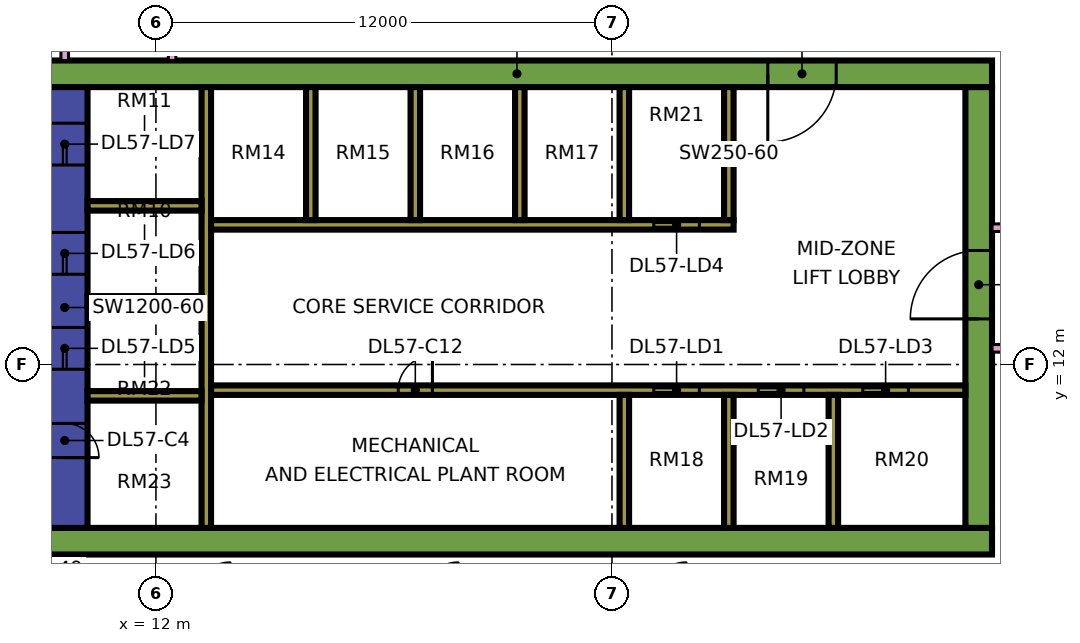
"""IFC4 building model, lengths in metres.
Left out: names, types, materials, properties, quantities, classifications, styles, units other than length and angle.
Written with IfcOpenShell. Run it as: python <this file> out.ifc"""

import sys

from ifc_helpers import new_model, si_unit, direction, frame, frame_2d, origin, place, context, subcontext, project, spatial, rectangle, extrude, element, fill, save


model = new_model("IFC4")
c1 = context("Model", 3, precision=1e-05, world=origin(), true_north=direction((0.0, 1.0)))
c2 = subcontext(c1, "Body", "Model", "MODEL_VIEW")
j1 = project(units=[si_unit("LENGTHUNIT", "METRE"), si_unit("PLANEANGLEUNIT", "RADIAN")], contexts=[c1])
p1 = place(None, origin())
s1 = spatial("IfcSite", under=j1, at=p1, CompositionType="ELEMENT")
p2 = place(p1, origin())
s2 = spatial("IfcBuilding", under=s1, at=p2, CompositionType="ELEMENT")
p3 = place(p2, frame((0.0, 0.0, 241.65)))
s3 = spatial("IfcBuildingStorey", under=s2, at=p3, CompositionType="ELEMENT", Elevation=241.65)
p4 = place(p3, frame((9.0, 7.35, 0.0), z_axis=(0.0, 0.0, 1.0), x_axis=(1.0, 0.0, 0.0)))
e1 = element("IfcWall", 1, at=p4, inside=s3, PredefinedType="SHEAR", context=c2, shape_type="SweptSolid", body=[
    extrude(rectangle(XDim=25.0, YDim=0.7, at=frame_2d((12.5, 0.0))), origin(), (0.0, 0.0, 1.0), 3.75),
])
p5 = place(p3, frame((9.0, 19.65, 0.0), z_axis=(0.0, 0.0, 1.0), x_axis=(1.0, 0.0, 0.0)))
e2 = element("IfcWall", 2, at=p5, inside=s3, PredefinedType="SHEAR", context=c2, shape_type="SweptSolid", body=[
    extrude(rectangle(XDim=25.0, YDim=0.7, at=frame_2d((12.5, 0.0))), origin(), (0.0, 0.0, 1.0), 3.75),
])
p6 = place(p5, frame((19.1, 0.0, 0.0)))
e3 = element("IfcOpeningElement", 3, at=p6, cuts=e2, PredefinedType="OPENING", context=c2, shape_type="SweptSolid", body=[
    extrude(rectangle(XDim=1.8, YDim=2.4, at=frame_2d((0.9, 1.2))), frame((0.0, 0.36, 0.0), z_axis=(0.0, -1.0, 0.0), x_axis=(1.0, 0.0, 0.0)), (0.0, 0.0, 1.0), 0.72),
])
p7 = place(p3, frame((9.6, 7.7, 0.0), z_axis=(0.0, 0.0, 1.0), x_axis=(0.0, 1.0, 0.0)))
e4 = element("IfcWall", 4, at=p7, inside=s3, PredefinedType="SHEAR", context=c2, shape_type="SweptSolid", body=[
    extrude(rectangle(XDim=11.6, YDim=1.2, at=frame_2d((5.8, 0.0))), origin(), (0.0, 0.0, 1.0), 3.75),
])
p8 = place(p7, frame((4.175, 0.0, 0.0)))
e5 = element("IfcOpeningElement", 5, at=p8, cuts=e4, PredefinedType="OPENING", context=c2, shape_type="SweptSolid", body=[
    extrude(rectangle(XDim=1.1, YDim=2.2, at=frame_2d((0.55, 1.1))), frame((0.0, 0.61, 0.0), z_axis=(0.0, -1.0, 0.0), x_axis=(1.0, 0.0, 0.0)), (0.0, 0.0, 1.0), 1.22),
])
p9 = place(p7, frame((6.675, 0.0, 0.0)))
e6 = element("IfcOpeningElement", 6, at=p9, cuts=e4, PredefinedType="OPENING", context=c2, shape_type="SweptSolid", body=[
    extrude(rectangle(XDim=1.1, YDim=2.2, at=frame_2d((0.55, 1.1))), frame((0.0, 0.61, 0.0), z_axis=(0.0, -1.0, 0.0), x_axis=(1.0, 0.0, 0.0)), (0.0, 0.0, 1.0), 1.22),
])
p10 = place(p7, frame((9.55, 0.0, 0.0)))
e7 = element("IfcOpeningElement", 7, at=p10, cuts=e4, PredefinedType="OPENING", context=c2, shape_type="SweptSolid", body=[
    extrude(rectangle(XDim=1.1, YDim=2.2, at=frame_2d((0.55, 1.1))), frame((0.0, 0.61, 0.0), z_axis=(0.0, -1.0, 0.0), x_axis=(1.0, 0.0, 0.0)), (0.0, 0.0, 1.0), 1.22),
])
p11 = place(p7, frame((1.85, 0.0, 0.0)))
e8 = element("IfcOpeningElement", 8, at=p11, cuts=e4, PredefinedType="OPENING", context=c2, shape_type="SweptSolid", body=[
    extrude(rectangle(XDim=0.9, YDim=2.1, at=frame_2d((0.45, 1.05))), frame((0.0, 0.61, 0.0), z_axis=(0.0, -1.0, 0.0), x_axis=(1.0, 0.0, 0.0)), (0.0, 0.0, 1.0), 1.22),
])
p12 = place(p3, frame((33.65, 7.7, 0.0), z_axis=(0.0, 0.0, 1.0), x_axis=(0.0, 1.0, 0.0)))
e9 = element("IfcWall", 9, at=p12, inside=s3, PredefinedType="SHEAR", context=c2, shape_type="SweptSolid", body=[
    extrude(rectangle(XDim=11.6, YDim=0.7, at=frame_2d((5.8, 0.0))), origin(), (0.0, 0.0, 1.0), 3.75),
])
p13 = place(p12, frame((5.5, 0.0, 0.0)))
e10 = element("IfcOpeningElement", 10, at=p13, cuts=e9, PredefinedType="OPENING", context=c2, shape_type="SweptSolid", body=[
    extrude(rectangle(XDim=1.8, YDim=2.4, at=frame_2d((0.9, 1.2))), frame((0.0, 0.36, 0.0), z_axis=(0.0, -1.0, 0.0), x_axis=(1.0, 0.0, 0.0)), (0.0, 0.0, 1.0), 0.72),
])
p14 = place(p3, frame((13.325, 7.7, 0.0), z_axis=(0.0, 0.0, 1.0), x_axis=(0.0, 1.0, 0.0)))
e11 = element("IfcWall", 11, at=p14, inside=s3, PredefinedType="SHEAR", context=c2, shape_type="SweptSolid", body=[
    extrude(rectangle(XDim=11.6, YDim=0.25, at=frame_2d((5.8, 0.0))), origin(), (0.0, 0.0, 1.0), 3.75),
])
p15 = place(p3, frame((13.45, 11.325, 0.0), z_axis=(0.0, 0.0, 1.0), x_axis=(1.0, 0.0, 0.0)))
e12 = element("IfcWall", 12, at=p15, inside=s3, PredefinedType="SHEAR", context=c2, shape_type="SweptSolid", body=[
    extrude(rectangle(XDim=19.85, YDim=0.25, at=frame_2d((9.925, 0.0))), origin(), (0.0, 0.0, 1.0), 3.75),
])
p16 = place(p15, frame((11.65, 0.0, 0.0)))
e13 = element("IfcOpeningElement", 13, at=p16, cuts=e12, PredefinedType="OPENING", context=c2, shape_type="SweptSolid", body=[
    extrude(rectangle(XDim=1.2, YDim=2.2, at=frame_2d((0.6, 1.1))), frame((0.0, 0.135, 0.0), z_axis=(0.0, -1.0, 0.0), x_axis=(1.0, 0.0, 0.0)), (0.0, 0.0, 1.0), 0.27),
])
p17 = place(p15, frame((14.4, 0.0, 0.0)))
e14 = element("IfcOpeningElement", 14, at=p17, cuts=e12, PredefinedType="OPENING", context=c2, shape_type="SweptSolid", body=[
    extrude(rectangle(XDim=1.2, YDim=2.2, at=frame_2d((0.6, 1.1))), frame((0.0, 0.135, 0.0), z_axis=(0.0, -1.0, 0.0), x_axis=(1.0, 0.0, 0.0)), (0.0, 0.0, 1.0), 0.27),
])
p18 = place(p15, frame((17.15, 0.0, 0.0)))
e15 = element("IfcOpeningElement", 15, at=p18, cuts=e12, PredefinedType="OPENING", context=c2, shape_type="SweptSolid", body=[
    extrude(rectangle(XDim=1.2, YDim=2.2, at=frame_2d((0.6, 1.1))), frame((0.0, 0.135, 0.0), z_axis=(0.0, -1.0, 0.0), x_axis=(1.0, 0.0, 0.0)), (0.0, 0.0, 1.0), 0.27),
])
p19 = place(p15, frame((4.925, 0.0, 0.0)))
e16 = element("IfcOpeningElement", 16, at=p19, cuts=e12, PredefinedType="OPENING", context=c2, shape_type="SweptSolid", body=[
    extrude(rectangle(XDim=0.9, YDim=2.1, at=frame_2d((0.45, 1.05))), frame((0.0, 0.135, 0.0), z_axis=(0.0, -1.0, 0.0), x_axis=(1.0, 0.0, 0.0)), (0.0, 0.0, 1.0), 0.27),
])
p20 = place(p3, frame((13.45, 15.675, 0.0), z_axis=(0.0, 0.0, 1.0), x_axis=(1.0, 0.0, 0.0)))
e17 = element("IfcWall", 17, at=p20, inside=s3, PredefinedType="SHEAR", context=c2, shape_type="SweptSolid", body=[
    extrude(rectangle(XDim=13.75, YDim=0.25, at=frame_2d((6.875, 0.0))), origin(), (0.0, 0.0, 1.0), 3.75),
])
p21 = place(p20, frame((11.65, 0.0, 0.0)))
e18 = element("IfcOpeningElement", 18, at=p21, cuts=e17, PredefinedType="OPENING", context=c2, shape_type="SweptSolid", body=[
    extrude(rectangle(XDim=1.2, YDim=2.2, at=frame_2d((0.6, 1.1))), frame((0.0, 0.135, 0.0), z_axis=(0.0, -1.0, 0.0), x_axis=(1.0, 0.0, 0.0)), (0.0, 0.0, 1.0), 0.27),
])
for number, where, z_axis, x_axis in (
    (19, (10.2, 11.175, 0.0), (0.0, 0.0, 1.0), (1.0, 0.0, 0.0)),
    (20, (10.2, 13.675, 0.0), (0.0, 0.0, 1.0), (1.0, 0.0, 0.0)),
    (21, (10.2, 16.175, 0.0), (0.0, 0.0, 1.0), (1.0, 0.0, 0.0)),
):
    element("IfcWall", number, at=place(p3, frame(where, z_axis=z_axis, x_axis=x_axis)), inside=s3, PredefinedType="SHEAR", context=c2, shape_type="SweptSolid", body=[
        extrude(rectangle(XDim=3.0, YDim=0.25, at=frame_2d((1.5, 0.0))), origin(), (0.0, 0.0, 1.0), 3.75),
    ])
for number, where, z_axis, x_axis in (
    (22, (24.325, 7.7, 0.0), (0.0, 0.0, 1.0), (0.0, 1.0, 0.0)),
    (23, (27.075, 7.7, 0.0), (0.0, 0.0, 1.0), (0.0, 1.0, 0.0)),
    (24, (29.825, 7.7, 0.0), (0.0, 0.0, 1.0), (0.0, 1.0, 0.0)),
    (25, (16.075, 15.8, 0.0), (0.0, 0.0, 1.0), (0.0, 1.0, 0.0)),
    (26, (18.825, 15.8, 0.0), (0.0, 0.0, 1.0), (0.0, 1.0, 0.0)),
    (27, (21.575, 15.8, 0.0), (0.0, 0.0, 1.0), (0.0, 1.0, 0.0)),
    (28, (24.325, 15.8, 0.0), (0.0, 0.0, 1.0), (0.0, 1.0, 0.0)),
    (29, (27.075, 15.8, 0.0), (0.0, 0.0, 1.0), (0.0, 1.0, 0.0)),
):
    element("IfcWall", number, at=place(p3, frame(where, z_axis=z_axis, x_axis=x_axis)), inside=s3, PredefinedType="SHEAR", context=c2, shape_type="SweptSolid", body=[
        extrude(rectangle(XDim=3.5, YDim=0.25, at=frame_2d((1.75, 0.0))), origin(), (0.0, 0.0, 1.0), 3.75),
    ])
p22 = place(p3, frame((-1.447, 12.553, 0.0), z_axis=(0.0, 0.0, 1.0), x_axis=(0.707106781187, -0.707106781187, 0.0)))
e30 = element("IfcWall", 30, at=p22, inside=s3, PredefinedType="SOLIDWALL", context=c2, shape_type="SweptSolid", body=[
    extrude(rectangle(XDim=19.799, YDim=0.15, at=frame_2d((9.899, 0.0))), origin(), (0.0, 0.0, 1.0), 3.35),
])
p23 = place(p22, frame((2.212, 0.0, 0.45)))
e31 = element("IfcOpeningElement", 31, at=p23, cuts=e30, PredefinedType="OPENING", context=c2, shape_type="SweptSolid", body=[
    extrude(rectangle(XDim=3.0, YDim=2.4, at=frame_2d((1.5, 1.2))), frame((0.0, 0.085, 0.0), z_axis=(0.0, -1.0, 0.0), x_axis=(1.0, 0.0, 0.0)), (0.0, 0.0, 1.0), 0.17),
])
p24 = place(p22, frame((10.216, 0.0, 0.45)))
e32 = element("IfcOpeningElement", 32, at=p24, cuts=e30, PredefinedType="OPENING", context=c2, shape_type="SweptSolid", body=[
    extrude(rectangle(XDim=3.0, YDim=2.4, at=frame_2d((1.5, 1.2))), frame((0.0, 0.085, 0.0), z_axis=(0.0, -1.0, 0.0), x_axis=(1.0, 0.0, 0.0)), (0.0, 0.0, 1.0), 0.17),
])
p25 = place(p3, frame((9.6, 20.0, 0.0), z_axis=(0.0, 0.0, 1.0), x_axis=(0.0, 1.0, 0.0)))
e33 = element("IfcWall", 33, at=p25, inside=s3, PredefinedType="PARTITIONING", context=c2, shape_type="SweptSolid", body=[
    extrude(rectangle(XDim=42.926, YDim=0.2, at=frame_2d((21.463, 0.0))), origin(), (0.0, 0.0, 1.0), 3.35),
])
p26 = place(p25, frame((28.95, 0.0, 0.0)))
e34 = element("IfcOpeningElement", 34, at=p26, cuts=e33, PredefinedType="OPENING", context=c2, shape_type="SweptSolid", body=[
    extrude(rectangle(XDim=1.0, YDim=2.1, at=frame_2d((0.5, 1.05))), frame((0.0, 0.11, 0.0), z_axis=(0.0, -1.0, 0.0), x_axis=(1.0, 0.0, 0.0)), (0.0, 0.0, 1.0), 0.22),
])
p27 = place(p25, frame((31.95, 0.0, 0.0)))
e35 = element("IfcOpeningElement", 35, at=p27, cuts=e33, PredefinedType="OPENING", context=c2, shape_type="SweptSolid", body=[
    extrude(rectangle(XDim=1.0, YDim=2.1, at=frame_2d((0.5, 1.05))), frame((0.0, 0.11, 0.0), z_axis=(0.0, -1.0, 0.0), x_axis=(1.0, 0.0, 0.0)), (0.0, 0.0, 1.0), 0.22),
])
p28 = place(p25, frame((0.6, 0.0, 0.0)))
e36 = element("IfcOpeningElement", 36, at=p28, cuts=e33, PredefinedType="OPENING", context=c2, shape_type="SweptSolid", body=[
    extrude(rectangle(XDim=1.2, YDim=2.1, at=frame_2d((0.6, 1.05))), frame((0.0, 0.11, 0.0), z_axis=(0.0, -1.0, 0.0), x_axis=(1.0, 0.0, 0.0)), (0.0, 0.0, 1.0), 0.22),
])
p29 = place(p25, frame((11.25, 0.0, 0.0)))
e37 = element("IfcOpeningElement", 37, at=p29, cuts=e33, PredefinedType="OPENING", context=c2, shape_type="SweptSolid", body=[
    extrude(rectangle(XDim=1.0, YDim=2.1, at=frame_2d((0.5, 1.05))), frame((0.0, 0.11, 0.0), z_axis=(0.0, -1.0, 0.0), x_axis=(1.0, 0.0, 0.0)), (0.0, 0.0, 1.0), 0.22),
])
p30 = place(p3, frame((12.425, 20.0, 0.0), z_axis=(0.0, 0.0, 1.0), x_axis=(0.0, 1.0, 0.0)))
e38 = element("IfcWall", 38, at=p30, inside=s3, PredefinedType="PARTITIONING", context=c2, shape_type="SweptSolid", body=[
    extrude(rectangle(XDim=43.0, YDim=0.2, at=frame_2d((21.5, 0.0))), origin(), (0.0, 0.0, 1.0), 3.35),
])
p31 = place(p30, frame((5.95, 0.0, 0.0)))
e39 = element("IfcOpeningElement", 39, at=p31, cuts=e38, PredefinedType="OPENING", context=c2, shape_type="SweptSolid", body=[
    extrude(rectangle(XDim=1.0, YDim=2.1, at=frame_2d((0.5, 1.05))), frame((0.0, 0.11, 0.0), z_axis=(0.0, -1.0, 0.0), x_axis=(1.0, 0.0, 0.0)), (0.0, 0.0, 1.0), 0.22),
])
p32 = place(p30, frame((12.0, 0.0, 0.0)))
e40 = element("IfcOpeningElement", 40, at=p32, cuts=e38, PredefinedType="OPENING", context=c2, shape_type="SweptSolid", body=[
    extrude(rectangle(XDim=1.0, YDim=2.1, at=frame_2d((0.5, 1.05))), frame((0.0, 0.11, 0.0), z_axis=(0.0, -1.0, 0.0), x_axis=(1.0, 0.0, 0.0)), (0.0, 0.0, 1.0), 0.22),
])
p33 = place(p30, frame((16.9, 0.0, 0.0)))
e41 = element("IfcOpeningElement", 41, at=p33, cuts=e38, PredefinedType="OPENING", context=c2, shape_type="SweptSolid", body=[
    extrude(rectangle(XDim=1.0, YDim=2.1, at=frame_2d((0.5, 1.05))), frame((0.0, 0.11, 0.0), z_axis=(0.0, -1.0, 0.0), x_axis=(1.0, 0.0, 0.0)), (0.0, 0.0, 1.0), 0.22),
])
p34 = place(p30, frame((41.05, 0.0, 0.0)))
e42 = element("IfcOpeningElement", 42, at=p34, cuts=e38, PredefinedType="OPENING", context=c2, shape_type="SweptSolid", body=[
    extrude(rectangle(XDim=1.0, YDim=2.1, at=frame_2d((0.5, 1.05))), frame((0.0, 0.11, 0.0), z_axis=(0.0, -1.0, 0.0), x_axis=(1.0, 0.0, 0.0)), (0.0, 0.0, 1.0), 0.22),
])
p35 = place(p30, frame((1.15, 0.0, 0.0)))
e43 = element("IfcOpeningElement", 43, at=p35, cuts=e38, PredefinedType="OPENING", context=c2, shape_type="SweptSolid", body=[
    extrude(rectangle(XDim=1.8, YDim=2.1, at=frame_2d((0.9, 1.05))), frame((0.0, 0.11, 0.0), z_axis=(0.0, -1.0, 0.0), x_axis=(1.0, 0.0, 0.0)), (0.0, 0.0, 1.0), 0.22),
])
p36 = place(p30, frame((28.6, 0.0, 0.0)))
e44 = element("IfcOpeningElement", 44, at=p36, cuts=e38, PredefinedType="OPENING", context=c2, shape_type="SweptSolid", body=[
    extrude(rectangle(XDim=1.8, YDim=2.1, at=frame_2d((0.9, 1.05))), frame((0.0, 0.11, 0.0), z_axis=(0.0, -1.0, 0.0), x_axis=(1.0, 0.0, 0.0)), (0.0, 0.0, 1.0), 0.22),
])
p37 = place(p3, frame((34.0, 12.425, 0.0), z_axis=(0.0, 0.0, 1.0), x_axis=(1.0, 0.0, 0.0)))
e45 = element("IfcWall", 45, at=p37, inside=s3, PredefinedType="PARTITIONING", context=c2, shape_type="SweptSolid", body=[
    extrude(rectangle(XDim=2.426, YDim=0.2, at=frame_2d((1.213, 0.0))), origin(), (0.0, 0.0, 1.0), 3.35),
])
p38 = place(p3, frame((34.0, 15.6, 0.0), z_axis=(0.0, 0.0, 1.0), x_axis=(1.0, 0.0, 0.0)))
e46 = element("IfcWall", 46, at=p38, inside=s3, PredefinedType="PARTITIONING", context=c2, shape_type="SweptSolid", body=[
    extrude(rectangle(XDim=10.35, YDim=0.2, at=frame_2d((5.175, 0.0))), origin(), (0.0, 0.0, 1.0), 3.35),
])
p39 = place(p38, frame((5.6, 0.0, 0.0)))
e47 = element("IfcOpeningElement", 47, at=p39, cuts=e46, PredefinedType="OPENING", context=c2, shape_type="SweptSolid", body=[
    extrude(rectangle(XDim=1.0, YDim=2.1, at=frame_2d((0.5, 1.05))), frame((0.0, 0.11, 0.0), z_axis=(0.0, -1.0, 0.0), x_axis=(1.0, 0.0, 0.0)), (0.0, 0.0, 1.0), 0.22),
])
p40 = place(p38, frame((0.45, 0.0, 0.0)))
e48 = element("IfcOpeningElement", 48, at=p40, cuts=e46, PredefinedType="OPENING", context=c2, shape_type="SweptSolid", body=[
    extrude(rectangle(XDim=1.2, YDim=2.1, at=frame_2d((0.6, 1.05))), frame((0.0, 0.11, 0.0), z_axis=(0.0, -1.0, 0.0), x_axis=(1.0, 0.0, 0.0)), (0.0, 0.0, 1.0), 0.22),
])
p41 = place(p16, origin())
e49 = element("IfcDoor", 49, at=p41, inside=s3, OperationType="DOUBLE_DOOR_SLIDING", PredefinedType="DOOR", context=c2, shape_type="SweptSolid", body=[
    extrude(rectangle(XDim=1.2, YDim=2.2, at=frame_2d((0.6, 1.1))), frame((0.0, 0.025, 0.0), z_axis=(0.0, -1.0, 0.0), x_axis=(1.0, 0.0, 0.0)), (0.0, 0.0, 1.0), 0.05),
])
fill(e13, e49)
p42 = place(p17, origin())
e50 = element("IfcDoor", 50, at=p42, inside=s3, OperationType="DOUBLE_DOOR_SLIDING", PredefinedType="DOOR", context=c2, shape_type="SweptSolid", body=[
    extrude(rectangle(XDim=1.2, YDim=2.2, at=frame_2d((0.6, 1.1))), frame((0.0, 0.025, 0.0), z_axis=(0.0, -1.0, 0.0), x_axis=(1.0, 0.0, 0.0)), (0.0, 0.0, 1.0), 0.05),
])
fill(e14, e50)
p43 = place(p18, origin())
e51 = element("IfcDoor", 51, at=p43, inside=s3, OperationType="DOUBLE_DOOR_SLIDING", PredefinedType="DOOR", context=c2, shape_type="SweptSolid", body=[
    extrude(rectangle(XDim=1.2, YDim=2.2, at=frame_2d((0.6, 1.1))), frame((0.0, 0.025, 0.0), z_axis=(0.0, -1.0, 0.0), x_axis=(1.0, 0.0, 0.0)), (0.0, 0.0, 1.0), 0.05),
])
fill(e15, e51)
p44 = place(p21, origin())
e52 = element("IfcDoor", 52, at=p44, inside=s3, OperationType="DOUBLE_DOOR_SLIDING", PredefinedType="DOOR", context=c2, shape_type="SweptSolid", body=[
    extrude(rectangle(XDim=1.2, YDim=2.2, at=frame_2d((0.6, 1.1))), frame((0.0, 0.025, 0.0), z_axis=(0.0, -1.0, 0.0), x_axis=(1.0, 0.0, 0.0)), (0.0, 0.0, 1.0), 0.05),
])
fill(e18, e52)
p45 = place(p8, origin())
e53 = element("IfcDoor", 53, at=p45, inside=s3, OperationType="DOUBLE_DOOR_SLIDING", PredefinedType="DOOR", context=c2, shape_type="SweptSolid", body=[
    extrude(rectangle(XDim=1.1, YDim=2.2, at=frame_2d((0.55, 1.1))), frame((0.0, 0.025, 0.0), z_axis=(0.0, -1.0, 0.0), x_axis=(1.0, 0.0, 0.0)), (0.0, 0.0, 1.0), 0.05),
])
fill(e5, e53)
p46 = place(p9, origin())
e54 = element("IfcDoor", 54, at=p46, inside=s3, OperationType="DOUBLE_DOOR_SLIDING", PredefinedType="DOOR", context=c2, shape_type="SweptSolid", body=[
    extrude(rectangle(XDim=1.1, YDim=2.2, at=frame_2d((0.55, 1.1))), frame((0.0, 0.025, 0.0), z_axis=(0.0, -1.0, 0.0), x_axis=(1.0, 0.0, 0.0)), (0.0, 0.0, 1.0), 0.05),
])
fill(e6, e54)
p47 = place(p10, origin())
e55 = element("IfcDoor", 55, at=p47, inside=s3, OperationType="DOUBLE_DOOR_SLIDING", PredefinedType="DOOR", context=c2, shape_type="SweptSolid", body=[
    extrude(rectangle(XDim=1.1, YDim=2.2, at=frame_2d((0.55, 1.1))), frame((0.0, 0.025, 0.0), z_axis=(0.0, -1.0, 0.0), x_axis=(1.0, 0.0, 0.0)), (0.0, 0.0, 1.0), 0.05),
])
fill(e7, e55)
p48 = place(p13, origin())
e56 = element("IfcDoor", 56, at=p48, inside=s3, OperationType="DOUBLE_DOOR_SINGLE_SWING", PredefinedType="DOOR", context=c2, shape_type="SweptSolid", body=[
    extrude(rectangle(XDim=1.8, YDim=2.4, at=frame_2d((0.9, 1.2))), frame((0.0, 0.025, 0.0), z_axis=(0.0, -1.0, 0.0), x_axis=(1.0, 0.0, 0.0)), (0.0, 0.0, 1.0), 0.05),
])
fill(e10, e56)
p49 = place(p6, frame((1.8, 0.0, 0.0), z_axis=(0.0, 0.0, 1.0), x_axis=(-1.0, 0.0, 0.0)))
e57 = element("IfcDoor", 57, at=p49, inside=s3, OperationType="DOUBLE_DOOR_SINGLE_SWING", PredefinedType="DOOR", context=c2, shape_type="SweptSolid", body=[
    extrude(rectangle(XDim=1.8, YDim=2.4, at=frame_2d((0.9, 1.2))), frame((0.0, 0.025, 0.0), z_axis=(0.0, -1.0, 0.0), x_axis=(1.0, 0.0, 0.0)), (0.0, 0.0, 1.0), 0.05),
])
fill(e3, e57)
p50 = place(p11, frame((0.9, 0.0, 0.0), z_axis=(0.0, 0.0, 1.0), x_axis=(-1.0, 0.0, 0.0)))
e58 = element("IfcDoor", 58, at=p50, inside=s3, OperationType="SINGLE_SWING_LEFT", PredefinedType="DOOR", context=c2, shape_type="SweptSolid", body=[
    extrude(rectangle(XDim=0.9, YDim=2.1, at=frame_2d((0.45, 1.05))), frame((0.0, 0.025, 0.0), z_axis=(0.0, -1.0, 0.0), x_axis=(1.0, 0.0, 0.0)), (0.0, 0.0, 1.0), 0.05),
])
fill(e8, e58)
p51 = place(p19, frame((0.9, 0.0, 0.0), z_axis=(0.0, 0.0, 1.0), x_axis=(-1.0, 0.0, 0.0)))
e59 = element("IfcDoor", 59, at=p51, inside=s3, OperationType="SINGLE_SWING_RIGHT", PredefinedType="DOOR", context=c2, shape_type="SweptSolid", body=[
    extrude(rectangle(XDim=0.9, YDim=2.1, at=frame_2d((0.45, 1.05))), frame((0.0, 0.025, 0.0), z_axis=(0.0, -1.0, 0.0), x_axis=(1.0, 0.0, 0.0)), (0.0, 0.0, 1.0), 0.05),
])
fill(e16, e59)
save(model, sys.argv[1])
